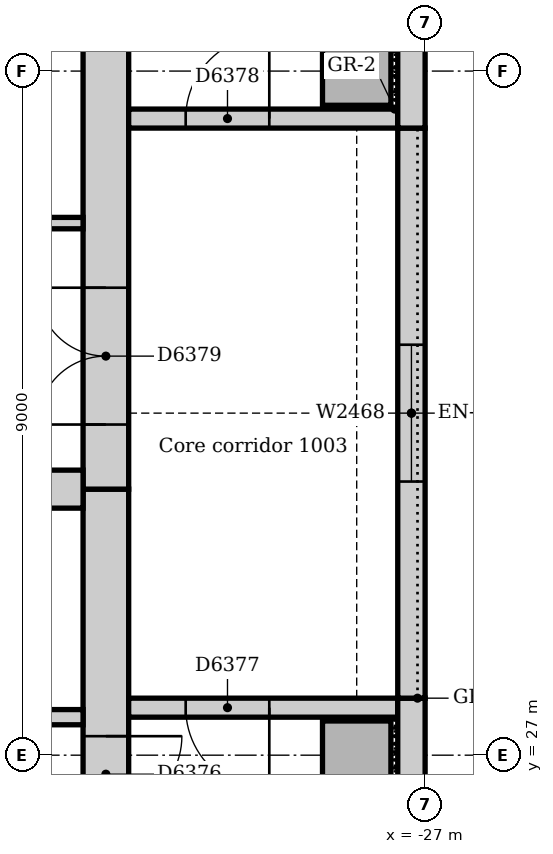
"""IFC4 building model, lengths in metres.
Left out: names, types, materials, properties, quantities, classifications, styles, units other than length and angle.
Written with IfcOpenShell. Run it as: python <this file> out.ifc"""

import sys

from ifc_helpers import new_model, si_unit, direction, frame, frame_2d, origin, origin_2d, place, context, subcontext, project, spatial, rectangle, extrude, element, fill, save


model = new_model("IFC4")
c1 = context("Model", 3, precision=1e-05, world=origin(), true_north=direction((0.0, 1.0)))
c2 = subcontext(c1, "Body", "Model", "MODEL_VIEW")
j1 = project(units=[si_unit("LENGTHUNIT", "METRE"), si_unit("PLANEANGLEUNIT", "RADIAN")], contexts=[c1])
p1 = place(None, origin())
s1 = spatial("IfcSite", under=j1, at=p1, CompositionType="ELEMENT")
p2 = place(p1, origin())
s2 = spatial("IfcBuilding", under=s1, at=p2, CompositionType="ELEMENT")
p3 = place(p2, frame((0.0, 0.0, 46.0)))
s3 = spatial("IfcBuildingStorey", under=s2, at=p3, CompositionType="ELEMENT", Elevation=46.0)
p4 = place(p3, frame((-31.2, 21.0, 0.0), z_axis=(0.0, 0.0, 1.0), x_axis=(0.0, 1.0, 0.0)))
e1 = element("IfcWall", 1, at=p4, inside=s3, PredefinedType="SOLIDWALL", context=c2, shape_type="SweptSolid", body=[
    extrude(rectangle(XDim=9.5, YDim=0.6, at=frame_2d((4.75, 0.0))), origin(), (0.0, 0.0, 1.0), 5.0),
])
p5 = place(p4, frame((5.25, 0.0, 0.0)))
e2 = element("IfcOpeningElement", 2, at=p5, cuts=e1, PredefinedType="OPENING", context=c2, shape_type="SweptSolid", body=[
    extrude(rectangle(XDim=1.0, YDim=2.1, at=frame_2d((0.5, 1.05))), frame((0.0, 0.31, 0.0), z_axis=(0.0, -1.0, 0.0), x_axis=(1.0, 0.0, 0.0)), (0.0, 0.0, 1.0), 0.62),
])
p6 = place(p3, frame((-31.2, 30.5, 0.0), z_axis=(0.0, 0.0, 1.0), x_axis=(0.0, 1.0, 0.0)))
e3 = element("IfcWall", 3, at=p6, inside=s3, PredefinedType="SOLIDWALL", context=c2, shape_type="SweptSolid", body=[
    extrude(rectangle(XDim=11.5, YDim=0.6, at=frame_2d((5.75, 0.0))), origin(), (0.0, 0.0, 1.0), 5.0),
])
p7 = place(p6, frame((0.85, 0.0, 0.0)))
e4 = element("IfcOpeningElement", 4, at=p7, cuts=e3, PredefinedType="OPENING", context=c2, shape_type="SweptSolid", body=[
    extrude(rectangle(XDim=1.8, YDim=2.1, at=frame_2d((0.9, 1.05))), frame((0.0, 0.31, 0.0), z_axis=(0.0, -1.0, 0.0), x_axis=(1.0, 0.0, 0.0)), (0.0, 0.0, 1.0), 0.62),
])
p8 = place(p3, frame((-42.0, 30.5, 0.0), z_axis=(0.0, 0.0, 1.0), x_axis=(1.0, 0.0, 0.0)))
e5 = element("IfcWall", 5, at=p8, inside=s3, PredefinedType="SOLIDWALL", context=c2, shape_type="SweptSolid", body=[
    extrude(rectangle(XDim=10.5, YDim=0.5, at=frame_2d((5.25, 0.0))), origin(), (0.0, 0.0, 1.0), 5.0),
])
p9 = place(p3, frame((-27.36, 27.625, 0.0), z_axis=(0.0, 0.0, 1.0), x_axis=(-1.0, 0.0, 0.0)))
e6 = element("IfcWall", 6, at=p9, inside=s3, PredefinedType="SOLIDWALL", context=c2, shape_type="SweptSolid", body=[
    extrude(rectangle(XDim=3.54, YDim=0.25, at=frame_2d((1.77, 0.0))), origin(), (0.0, 0.0, 1.0), 5.0),
])
p10 = place(p9, frame((1.69, 0.0, 0.0)))
e7 = element("IfcOpeningElement", 7, at=p10, cuts=e6, PredefinedType="OPENING", context=c2, shape_type="SweptSolid", body=[
    extrude(rectangle(XDim=1.1, YDim=2.1, at=frame_2d((0.55, 1.05))), frame((0.0, 0.135, 0.0), z_axis=(0.0, -1.0, 0.0), x_axis=(1.0, 0.0, 0.0)), (0.0, 0.0, 1.0), 0.27),
])
p11 = place(p3, frame((-30.9, 35.375, 0.0), z_axis=(0.0, 0.0, 1.0), x_axis=(1.0, 0.0, 0.0)))
e8 = element("IfcWall", 8, at=p11, inside=s3, PredefinedType="SOLIDWALL", context=c2, shape_type="SweptSolid", body=[
    extrude(rectangle(XDim=3.54, YDim=0.25, at=frame_2d((1.77, 0.0))), origin(), (0.0, 0.0, 1.0), 5.0),
])
p12 = place(p11, frame((0.75, 0.0, 0.0)))
e9 = element("IfcOpeningElement", 9, at=p12, cuts=e8, PredefinedType="OPENING", context=c2, shape_type="SweptSolid", body=[
    extrude(rectangle(XDim=1.1, YDim=2.1, at=frame_2d((0.55, 1.05))), frame((0.0, 0.135, 0.0), z_axis=(0.0, -1.0, 0.0), x_axis=(1.0, 0.0, 0.0)), (0.0, 0.0, 1.0), 0.27),
])
for number, where, z_axis, x_axis in (
    (10, (-27.9, 27.0, 0.0), (0.0, 0.0, 1.0), (1.0, 0.0, 0.0)),
    (11, (-27.9, 36.0, 0.0), (0.0, 0.0, 1.0), (1.0, 0.0, 0.0)),
):
    element("IfcColumn", number, at=place(p3, frame(where, z_axis=z_axis, x_axis=x_axis)), inside=s3, PredefinedType="COLUMN", context=c2, shape_type="SweptSolid", body=[
        extrude(rectangle(XDim=0.9, YDim=0.9, at=origin_2d()), origin(), (0.0, 0.0, 1.0), 5.0),
    ])
p13 = place(p3, frame((-27.18, 21.0, 0.0), z_axis=(0.0, 0.0, 1.0), x_axis=(0.0, 1.0, 0.0)))
e12 = element("IfcWall", 12, at=p13, inside=s3, PredefinedType="STANDARD", context=c2, shape_type="SweptSolid", body=[
    extrude(rectangle(XDim=6.75, YDim=0.36, at=frame_2d((3.375, 0.0))), origin(), (0.0, 0.0, 1.0), 4.85),
])
p14 = place(p3, frame((-27.18, 27.75, 0.0), z_axis=(0.0, 0.0, 1.0), x_axis=(0.0, 1.0, 0.0)))
e13 = element("IfcWall", 13, at=p14, inside=s3, PredefinedType="STANDARD", context=c2, shape_type="SweptSolid", body=[
    extrude(rectangle(XDim=7.5, YDim=0.36, at=frame_2d((3.75, 0.0))), origin(), (0.0, 0.0, 1.0), 4.85),
])
p15 = place(p14, frame((2.85, 0.0, 1.2)))
e14 = element("IfcOpeningElement", 14, at=p15, cuts=e13, PredefinedType="OPENING", context=c2, shape_type="SweptSolid", body=[
    extrude(rectangle(XDim=1.8, YDim=1.2, at=frame_2d((0.9, 0.6))), frame((0.0, 0.19, 0.0), z_axis=(0.0, -1.0, 0.0), x_axis=(1.0, 0.0, 0.0)), (0.0, 0.0, 1.0), 0.38),
])
p16 = place(p3, frame((-27.18, 35.25, 0.0), z_axis=(0.0, 0.0, 1.0), x_axis=(0.0, 1.0, 0.0)))
e15 = element("IfcWall", 15, at=p16, inside=s3, PredefinedType="STANDARD", context=c2, shape_type="SweptSolid", body=[
    extrude(rectangle(XDim=5.507, YDim=0.36, at=frame_2d((2.754, 0.0))), origin(), (0.0, 0.0, 1.0), 4.85),
])
p17 = place(p3, frame((-34.9, 27.5, 0.0), z_axis=(0.0, 0.0, 1.0), x_axis=(1.0, 0.0, 0.0)))
e16 = element("IfcWall", 16, at=p17, inside=s3, PredefinedType="SOLIDWALL", context=c2, shape_type="SweptSolid", body=[
    extrude(rectangle(XDim=3.4, YDim=0.2, at=frame_2d((1.7, 0.0))), origin(), (0.0, 0.0, 1.0), 5.0),
])
p18 = place(p17, frame((1.1, 0.0, 0.0)))
e17 = element("IfcOpeningElement", 17, at=p18, cuts=e16, PredefinedType="OPENING", context=c2, shape_type="SweptSolid", body=[
    extrude(rectangle(XDim=1.1, YDim=2.1, at=frame_2d((0.55, 1.05))), frame((0.0, 0.11, 0.0), z_axis=(0.0, -1.0, 0.0), x_axis=(1.0, 0.0, 0.0)), (0.0, 0.0, 1.0), 0.22),
])
p19 = place(p3, frame((-34.075, 34.0, 0.0), z_axis=(0.0, 0.0, 1.0), x_axis=(1.0, 0.0, 0.0)))
e18 = element("IfcWall", 18, at=p19, inside=s3, PredefinedType="SOLIDWALL", context=c2, shape_type="SweptSolid", body=[
    extrude(rectangle(XDim=2.575, YDim=0.15, at=frame_2d((1.288, 0.0))), origin(), (0.0, 0.0, 1.0), 5.0),
])
p20 = place(p15, origin())
e19 = element("IfcWindow", 19, at=p20, inside=s3, PartitioningType="SINGLE_PANEL", PredefinedType="WINDOW", context=c2, shape_type="SweptSolid", body=[
    extrude(rectangle(XDim=1.8, YDim=1.2, at=frame_2d((0.9, 0.6))), frame((0.0, 0.13, 0.0), z_axis=(0.0, -1.0, 0.0), x_axis=(1.0, 0.0, 0.0)), (0.0, 0.0, 1.0), 0.06),
])
fill(e14, e19)
p21 = place(p5, frame((1.0, 0.0, 0.0), z_axis=(0.0, 0.0, 1.0), x_axis=(-1.0, 0.0, 0.0)))
e20 = element("IfcDoor", 20, at=p21, inside=s3, OperationType="SINGLE_SWING_LEFT", PredefinedType="DOOR", context=c2, shape_type="SweptSolid", body=[
    extrude(rectangle(XDim=1.0, YDim=2.1, at=frame_2d((0.5, 1.05))), frame((0.0, 0.025, 0.0), z_axis=(0.0, -1.0, 0.0), x_axis=(1.0, 0.0, 0.0)), (0.0, 0.0, 1.0), 0.05),
])
fill(e2, e20)
p22 = place(p10, origin())
e21 = element("IfcDoor", 21, at=p22, inside=s3, OperationType="SINGLE_SWING_LEFT", PredefinedType="DOOR", context=c2, shape_type="SweptSolid", body=[
    extrude(rectangle(XDim=1.1, YDim=2.1, at=frame_2d((0.55, 1.05))), frame((0.0, 0.025, 0.0), z_axis=(0.0, -1.0, 0.0), x_axis=(1.0, 0.0, 0.0)), (0.0, 0.0, 1.0), 0.05),
])
fill(e7, e21)
p23 = place(p12, origin())
e22 = element("IfcDoor", 22, at=p23, inside=s3, OperationType="SINGLE_SWING_RIGHT", PredefinedType="DOOR", context=c2, shape_type="SweptSolid", body=[
    extrude(rectangle(XDim=1.1, YDim=2.1, at=frame_2d((0.55, 1.05))), frame((0.0, 0.025, 0.0), z_axis=(0.0, -1.0, 0.0), x_axis=(1.0, 0.0, 0.0)), (0.0, 0.0, 1.0), 0.05),
])
fill(e9, e22)
p24 = place(p7, origin())
e23 = element("IfcDoor", 23, at=p24, inside=s3, OperationType="DOUBLE_DOOR_SINGLE_SWING", PredefinedType="DOOR", context=c2, shape_type="SweptSolid", body=[
    extrude(rectangle(XDim=1.8, YDim=2.1, at=frame_2d((0.9, 1.05))), frame((0.0, 0.025, 0.0), z_axis=(0.0, -1.0, 0.0), x_axis=(1.0, 0.0, 0.0)), (0.0, 0.0, 1.0), 0.05),
])
fill(e4, e23)
save(model, sys.argv[1])
